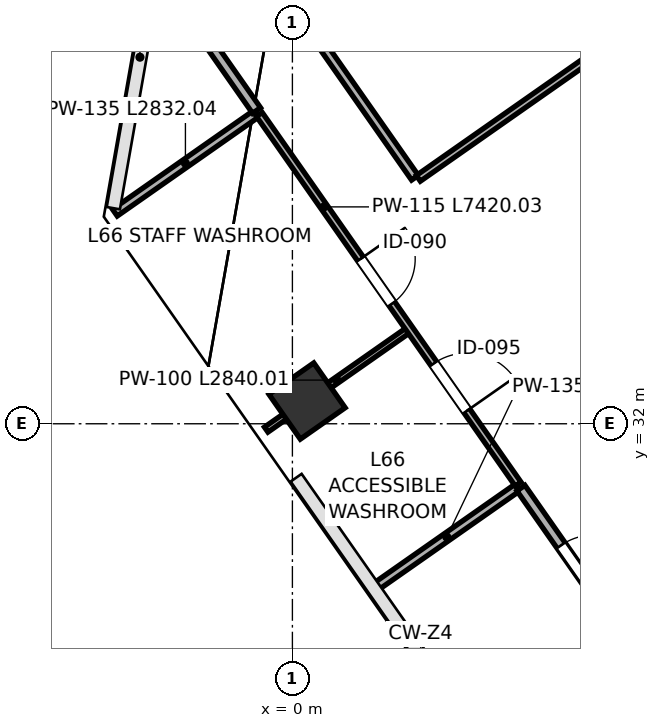
"""IFC4 building model, lengths in metres.
Left out: names, types, materials, properties, quantities, classifications, styles, units other than length and angle.
Written with IfcOpenShell. Run it as: python <this file> out.ifc"""

import sys

from ifc_helpers import new_model, si_unit, direction, frame, frame_2d, origin, origin_2d, place, context, subcontext, project, spatial, rectangle, extrude, source, transform, mapped, element, fill, save


model = new_model("IFC4")
c1 = context("Model", 3, precision=1e-05, world=origin(), true_north=direction((0.0, 1.0)))
c2 = subcontext(c1, "Body", "Model", "MODEL_VIEW")
j1 = project(units=[si_unit("LENGTHUNIT", "METRE"), si_unit("PLANEANGLEUNIT", "RADIAN")], contexts=[c1])
p1 = place(None, origin())
s1 = spatial("IfcSite", under=j1, at=p1, CompositionType="ELEMENT")
p2 = place(p1, origin())
s2 = spatial("IfcBuilding", under=s1, at=p2, CompositionType="ELEMENT")
p3 = place(p2, frame((0.0, 0.0, 293.8)))
s3 = spatial("IfcBuildingStorey", under=s2, at=p3, CompositionType="ELEMENT", Elevation=293.8)
m1 = source(origin(), c2, "Body", "SweptSolid", [
    extrude(rectangle(XDim=0.9, YDim=0.9, at=origin_2d()), origin(), (0.0, 0.0, 1.0), 4.999),
])
p4 = place(p3, frame((0.241, 32.374, 0.001), z_axis=(0.0, 0.0, 1.0), x_axis=(-0.573576436351, 0.819152044289, 0.0)))
e1 = element("IfcColumn", 1, at=p4, inside=s3, PredefinedType="COLUMN", context=c2, shape_type="MappedRepresentation", body=[
    mapped(m1, transform((0.0, 0.0, 0.0), scale=1.0)),
])
p5 = place(p3, frame((-2.919, 35.471, 0.0), z_axis=(0.0, 0.0, 1.0), x_axis=(0.819098241059, 0.573653267657, 0.0)))
e2 = element("IfcWall", 2, at=p5, inside=s3, PredefinedType="PARTITIONING", context=c2, shape_type="SweptSolid", body=[
    extrude(rectangle(XDim=2.832, YDim=0.135, at=frame_2d((1.416, 0.0))), origin(), (0.0, 0.0, 1.0), 4.76),
])
p6 = place(p3, frame((-2.214, 39.471, 0.0), z_axis=(0.0, 0.0, 1.0), x_axis=(0.573653267657, -0.819098241059, 0.0)))
e3 = element("IfcWall", 3, at=p6, inside=s3, PredefinedType="PARTITIONING", context=c2, shape_type="SweptSolid", body=[
    extrude(rectangle(XDim=2.832, YDim=0.16, at=frame_2d((1.416, 0.0))), origin(), (0.0, 0.0, 1.0), 4.76),
])
p7 = place(p3, frame((-0.431, 31.904, 0.0), z_axis=(0.0, 0.0, 1.0), x_axis=(0.819122867865, 0.573618102347, 0.0)))
e4 = element("IfcWall", 4, at=p7, inside=s3, PredefinedType="PARTITIONING", context=c2, shape_type="SweptSolid", body=[
    extrude(rectangle(XDim=2.84, YDim=0.1, at=frame_2d((1.42, 0.0))), origin(), (0.0, 0.0, 1.0), 4.095),
])
p8 = place(p3, frame((1.376, 29.323, 0.0), z_axis=(0.0, 0.0, 1.0), x_axis=(0.819163257805, 0.573560421458, 0.0)))
e5 = element("IfcWall", 5, at=p8, inside=s3, PredefinedType="PARTITIONING", context=c2, shape_type="SweptSolid", body=[
    extrude(rectangle(XDim=2.84, YDim=0.135, at=frame_2d((1.42, 0.0))), origin(), (0.0, 0.0, 1.0), 4.095),
])
p9 = place(p3, frame((-0.544, 37.086, 0.0), z_axis=(0.0, 0.0, 1.0), x_axis=(0.573568336404, -0.819157715873, 0.0)))
e6 = element("IfcWall", 6, at=p9, inside=s3, PredefinedType="PARTITIONING", context=c2, shape_type="SweptSolid", body=[
    extrude(rectangle(XDim=7.42, YDim=0.115, at=frame_2d((3.71, 0.0))), origin(), (0.0, 0.0, 1.0), 4.76),
])
p10 = place(p9, frame((2.9, 0.0, 0.0)))
e7 = element("IfcOpeningElement", 7, at=p10, cuts=e6, PredefinedType="OPENING", context=c2, shape_type="SweptSolid", body=[
    extrude(rectangle(XDim=0.9, YDim=2.15, at=frame_2d((0.45, 1.075))), frame((0.0, 0.067, 0.0), z_axis=(0.0, -1.0, 0.0), x_axis=(1.0, 0.0, 0.0)), (0.0, 0.0, 1.0), 0.135),
])
p11 = place(p9, frame((5.0, 0.0, 0.0)))
e8 = element("IfcOpeningElement", 8, at=p11, cuts=e6, PredefinedType="OPENING", context=c2, shape_type="SweptSolid", body=[
    extrude(rectangle(XDim=0.95, YDim=2.15, at=frame_2d((0.475, 1.075))), frame((0.0, 0.067, 0.0), z_axis=(0.0, -1.0, 0.0), x_axis=(1.0, 0.0, 0.0)), (0.0, 0.0, 1.0), 0.135),
])
p12 = place(p3, frame((3.758, 30.942, 0.0), z_axis=(0.0, 0.0, 1.0), x_axis=(0.573575634469, -0.819152605772, 0.0)))
e9 = element("IfcWall", 9, at=p12, inside=s3, PredefinedType="PARTITIONING", context=c2, shape_type="SweptSolid", body=[
    extrude(rectangle(XDim=11.57, YDim=0.16, at=frame_2d((5.785, 0.0))), origin(), (0.0, 0.0, 1.0), 4.76),
])
p13 = place(p12, frame((1.15, 0.0, 0.0)))
e10 = element("IfcOpeningElement", 10, at=p13, cuts=e9, PredefinedType="OPENING", context=c2, shape_type="SweptSolid", body=[
    extrude(rectangle(XDim=0.95, YDim=2.15, at=frame_2d((0.475, 1.075))), frame((0.0, 0.09, 0.0), z_axis=(0.0, -1.0, 0.0), x_axis=(1.0, 0.0, 0.0)), (0.0, 0.0, 1.0), 0.18),
])
p14 = place(p3, frame((-1.443, 40.985, 0.0), z_axis=(0.0, 0.0, 1.0), x_axis=(0.573587332855, -0.819144414367, 0.0)))
e11 = element("IfcWall", 11, at=p14, inside=s3, PredefinedType="PARTITIONING", context=c2, shape_type="SweptSolid", body=[
    extrude(rectangle(XDim=6.03, YDim=0.135, at=frame_2d((3.015, 0.0))), origin(), (0.0, 0.0, 1.0), 4.76),
])
p15 = place(p3, frame((2.071, 36.036, 0.0), z_axis=(0.0, 0.0, 1.0), x_axis=(0.819154854942, 0.573572422302, 0.0)))
e12 = element("IfcWall", 12, at=p15, inside=s3, PredefinedType="PARTITIONING", context=c2, shape_type="SweptSolid", body=[
    extrude(rectangle(XDim=29.62, YDim=0.115, at=frame_2d((14.81, 0.0))), origin(), (0.0, 0.0, 1.0), 4.76),
])
p16 = place(p15, frame((4.2, 0.0, 0.0)))
e13 = element("IfcOpeningElement", 13, at=p16, cuts=e12, PredefinedType="OPENING", context=c2, shape_type="SweptSolid", body=[
    extrude(rectangle(XDim=0.95, YDim=2.15, at=frame_2d((0.475, 1.075))), frame((0.0, 0.067, 0.0), z_axis=(0.0, -1.0, 0.0), x_axis=(1.0, 0.0, 0.0)), (0.0, 0.0, 1.0), 0.135),
])
m2 = source(origin(), c2, "Body", "SweptSolid", [
    extrude(rectangle(XDim=0.9, YDim=2.15, at=frame_2d((0.45, 1.075))), frame((0.0, 0.025, 0.0), z_axis=(0.0, -1.0, 0.0), x_axis=(1.0, 0.0, 0.0)), (0.0, 0.0, 1.0), 0.05),
])
p17 = place(p10, origin())
e14 = element("IfcDoor", 14, at=p17, inside=s3, OperationType="SINGLE_SWING_LEFT", PredefinedType="DOOR", context=c2, shape_type="MappedRepresentation", body=[
    mapped(m2, transform((0.0, 0.0, 0.0), scale=1.0)),
])
fill(e7, e14)
m3 = source(origin(), c2, "Body", "SweptSolid", [
    extrude(rectangle(XDim=0.95, YDim=2.15, at=frame_2d((0.475, 1.075))), frame((0.0, 0.025, 0.0), z_axis=(0.0, -1.0, 0.0), x_axis=(1.0, 0.0, 0.0)), (0.0, 0.0, 1.0), 0.05),
])
p18 = place(p11, origin())
e15 = element("IfcDoor", 15, at=p18, inside=s3, OperationType="SINGLE_SWING_RIGHT", PredefinedType="DOOR", context=c2, shape_type="MappedRepresentation", body=[
    mapped(m3, transform((0.0, 0.0, 0.0), scale=1.0)),
])
fill(e8, e15)
m4 = source(origin(), c2, "Body", "SweptSolid", [
    extrude(rectangle(XDim=0.95, YDim=2.15, at=frame_2d((0.475, 1.075))), frame((0.0, 0.025, 0.0), z_axis=(0.0, -1.0, 0.0), x_axis=(1.0, 0.0, 0.0)), (0.0, 0.0, 1.0), 0.05),
])
p19 = place(p13, origin())
e16 = element("IfcDoor", 16, at=p19, inside=s3, OperationType="SINGLE_SWING_RIGHT", PredefinedType="DOOR", context=c2, shape_type="MappedRepresentation", body=[
    mapped(m4, transform((0.0, 0.0, 0.0), scale=1.0)),
])
fill(e10, e16)
save(model, sys.argv[1])
